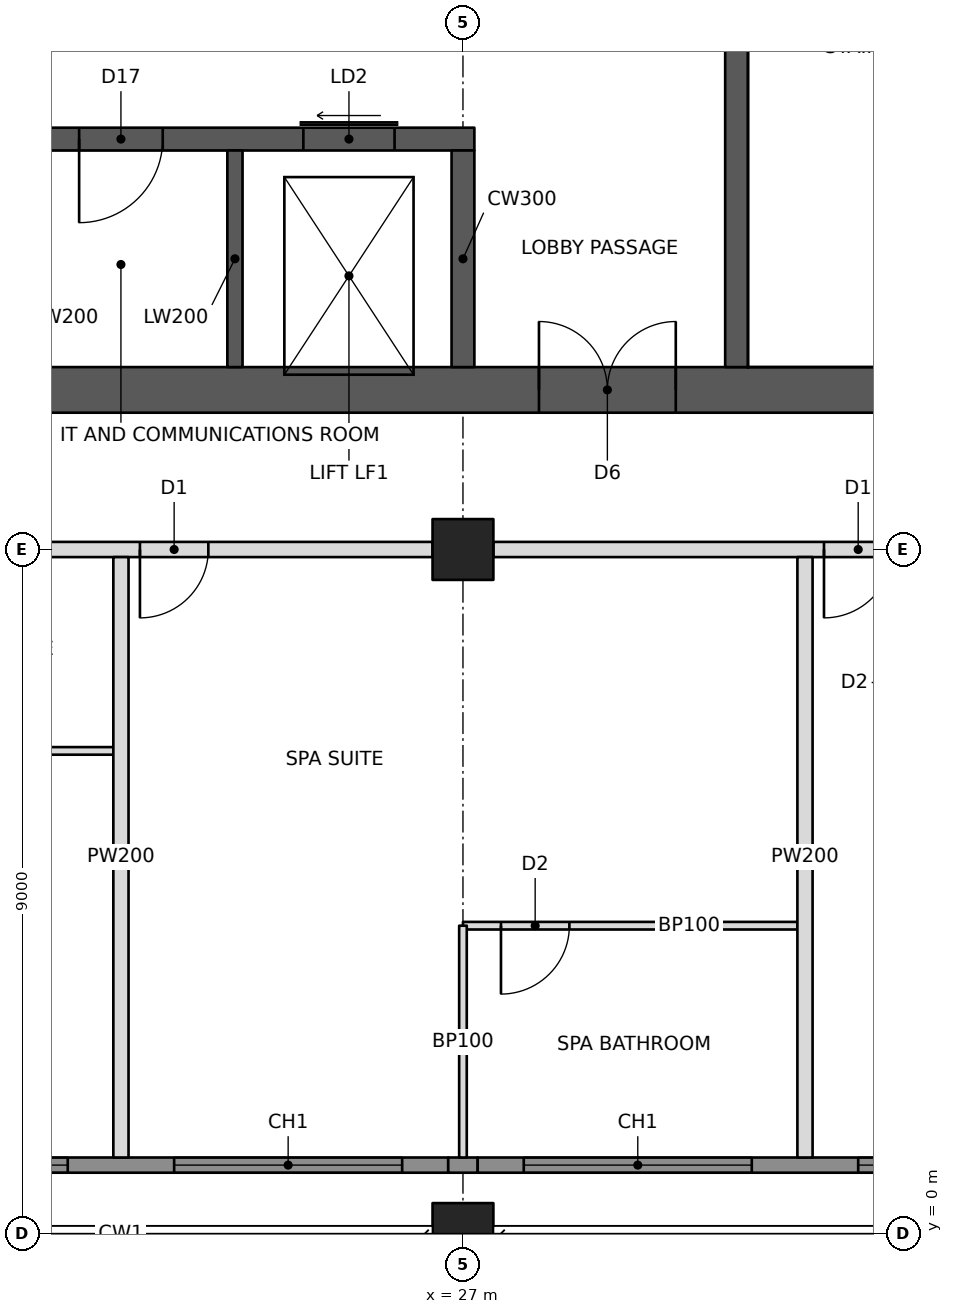
"""IFC4 building model, lengths in metres.
Left out: names, types, materials, properties, quantities, classifications, styles, units other than length and angle.
Written with IfcOpenShell. Run it as: python <this file> out.ifc"""

import sys

from ifc_helpers import new_model, si_unit, direction, frame, frame_2d, origin, origin_2d, place, context, subcontext, project, spatial, rectangle, hollow_rectangle, extrude, element, fill, save


model = new_model("IFC4")
c1 = context("Model", 3, precision=1e-05, world=origin(), true_north=direction((0.0, 1.0)))
c2 = subcontext(c1, "Body", "Model", "MODEL_VIEW")
j1 = project(units=[si_unit("LENGTHUNIT", "METRE"), si_unit("PLANEANGLEUNIT", "RADIAN")], contexts=[c1])
p1 = place(None, origin())
s1 = spatial("IfcSite", under=j1, at=p1, CompositionType="ELEMENT")
p2 = place(p1, origin())
s2 = spatial("IfcBuilding", under=s1, at=p2, CompositionType="ELEMENT")
p3 = place(p2, frame((0.0, 0.0, 204.6)))
s3 = spatial("IfcBuildingStorey", under=s2, at=p3, CompositionType="ELEMENT", Elevation=204.6)
p4 = place(p3, frame((27.0, 0.0, 0.0), z_axis=(0.0, 0.0, 1.0), x_axis=(1.0, 0.0, 0.0)))
e1 = element("IfcColumn", 1, at=p4, inside=s3, PredefinedType="COLUMN", context=c2, shape_type="SweptSolid", body=[
    extrude(hollow_rectangle(XDim=0.8, YDim=0.8, WallThickness=0.06, at=origin_2d()), origin(), (0.0, 0.0, 1.0), 3.4),
])
p5 = place(p3, frame((27.0, 9.0, 0.0), z_axis=(0.0, 0.0, 1.0), x_axis=(1.0, 0.0, 0.0)))
e2 = element("IfcColumn", 2, at=p5, inside=s3, PredefinedType="COLUMN", context=c2, shape_type="SweptSolid", body=[
    extrude(hollow_rectangle(XDim=0.8, YDim=0.8, WallThickness=0.05, at=origin_2d()), origin(), (0.0, 0.0, 1.0), 3.4),
])
p6 = place(p3, frame((10.8, 11.1, 0.0), z_axis=(0.0, 0.0, 1.0), x_axis=(1.0, 0.0, 0.0)))
e3 = element("IfcWall", 3, at=p6, inside=s3, PredefinedType="SHEAR", context=c2, shape_type="SweptSolid", body=[
    extrude(rectangle(XDim=23.4, YDim=0.6, at=frame_2d((11.7, 0.0))), origin(), (0.0, 0.0, 1.0), 3.4),
])
p7 = place(p6, frame((1.0, 0.0, 0.0)))
e4 = element("IfcOpeningElement", 4, at=p7, cuts=e3, PredefinedType="OPENING", context=c2, shape_type="SweptSolid", body=[
    extrude(rectangle(XDim=1.0, YDim=2.1, at=frame_2d((0.5, 1.05))), frame((0.0, 0.31, 0.0), z_axis=(0.0, -1.0, 0.0), x_axis=(1.0, 0.0, 0.0)), (0.0, 0.0, 1.0), 0.62),
])
p8 = place(p6, frame((17.2, 0.0, 0.0)))
e5 = element("IfcOpeningElement", 5, at=p8, cuts=e3, PredefinedType="OPENING", context=c2, shape_type="SweptSolid", body=[
    extrude(rectangle(XDim=1.8, YDim=2.1, at=frame_2d((0.9, 1.05))), frame((0.0, 0.31, 0.0), z_axis=(0.0, -1.0, 0.0), x_axis=(1.0, 0.0, 0.0)), (0.0, 0.0, 1.0), 0.62),
])
p9 = place(p3, frame((18.15, 14.4, 0.0), z_axis=(0.0, 0.0, 1.0), x_axis=(1.0, 0.0, 0.0)))
e6 = element("IfcWall", 6, at=p9, inside=s3, PredefinedType="SHEAR", context=c2, shape_type="SweptSolid", body=[
    extrude(rectangle(XDim=9.0, YDim=0.3, at=frame_2d((4.5, 0.0))), origin(), (0.0, 0.0, 1.0), 3.4),
])
p10 = place(p9, frame((0.8, 0.0, 0.0)))
e7 = element("IfcOpeningElement", 7, at=p10, cuts=e6, PredefinedType="OPENING", context=c2, shape_type="SweptSolid", body=[
    extrude(rectangle(XDim=1.1, YDim=2.1, at=frame_2d((0.55, 1.05))), frame((0.0, 0.16, 0.0), z_axis=(0.0, -1.0, 0.0), x_axis=(1.0, 0.0, 0.0)), (0.0, 0.0, 1.0), 0.32),
])
p11 = place(p9, frame((6.75, 0.0, 0.0)))
e8 = element("IfcOpeningElement", 8, at=p11, cuts=e6, PredefinedType="OPENING", context=c2, shape_type="SweptSolid", body=[
    extrude(rectangle(XDim=1.2, YDim=2.1, at=frame_2d((0.6, 1.05))), frame((0.0, 0.16, 0.0), z_axis=(0.0, -1.0, 0.0), x_axis=(1.0, 0.0, 0.0)), (0.0, 0.0, 1.0), 0.32),
])
p12 = place(p9, frame((3.8, 0.0, 0.0)))
e9 = element("IfcOpeningElement", 9, at=p12, cuts=e6, PredefinedType="OPENING", context=c2, shape_type="SweptSolid", body=[
    extrude(rectangle(XDim=1.1, YDim=2.1, at=frame_2d((0.55, 1.05))), frame((0.0, 0.16, 0.0), z_axis=(0.0, -1.0, 0.0), x_axis=(1.0, 0.0, 0.0)), (0.0, 0.0, 1.0), 0.32),
])
p13 = place(p3, frame((27.0, 11.4, 0.0), z_axis=(0.0, 0.0, 1.0), x_axis=(0.0, 1.0, 0.0)))
e10 = element("IfcWall", 10, at=p13, inside=s3, PredefinedType="SHEAR", context=c2, shape_type="SweptSolid", body=[
    extrude(rectangle(XDim=2.85, YDim=0.3, at=frame_2d((1.425, 0.0))), origin(), (0.0, 0.0, 1.0), 3.4),
])
p14 = place(p3, frame((24.0, 11.4, 0.0), z_axis=(0.0, 0.0, 1.0), x_axis=(0.0, 1.0, 0.0)))
e11 = element("IfcWall", 11, at=p14, inside=s3, PredefinedType="SHEAR", context=c2, shape_type="SweptSolid", body=[
    extrude(rectangle(XDim=2.85, YDim=0.2, at=frame_2d((1.425, 0.0))), origin(), (0.0, 0.0, 1.0), 3.4),
])
p15 = place(p3, frame((30.6, 11.4, 0.0), z_axis=(0.0, 0.0, 1.0), x_axis=(0.0, 1.0, 0.0)))
e12 = element("IfcWall", 12, at=p15, inside=s3, PredefinedType="SHEAR", context=c2, shape_type="SweptSolid", body=[
    extrude(rectangle(XDim=13.2, YDim=0.3, at=frame_2d((6.6, 0.0))), origin(), (0.0, 0.0, 1.0), 3.4),
])
p16 = place(p3, frame((18.4, 9.0, 0.0), z_axis=(0.0, 0.0, 1.0), x_axis=(1.0, 0.0, 0.0)))
e13 = element("IfcWall", 13, at=p16, inside=s3, PredefinedType="PARTITIONING", context=c2, shape_type="SweptSolid", body=[
    extrude(rectangle(XDim=8.2, YDim=0.2, at=frame_2d((4.1, 0.0))), origin(), (0.0, 0.0, 1.0), 2.405),
])
p17 = place(p16, frame((4.35, 0.0, 0.0)))
e14 = element("IfcOpeningElement", 14, at=p17, cuts=e13, PredefinedType="OPENING", context=c2, shape_type="SweptSolid", body=[
    extrude(rectangle(XDim=0.9, YDim=2.1, at=frame_2d((0.45, 1.05))), frame((0.0, 0.11, 0.0), z_axis=(0.0, -1.0, 0.0), x_axis=(1.0, 0.0, 0.0)), (0.0, 0.0, 1.0), 0.22),
])
p18 = place(p3, frame((27.4, 9.0, 0.0), z_axis=(0.0, 0.0, 1.0), x_axis=(1.0, 0.0, 0.0)))
e15 = element("IfcWall", 15, at=p18, inside=s3, PredefinedType="PARTITIONING", context=c2, shape_type="SweptSolid", body=[
    extrude(rectangle(XDim=8.2, YDim=0.2, at=frame_2d((4.1, 0.0))), origin(), (0.0, 0.0, 1.0), 2.405),
])
p19 = place(p18, frame((4.35, 0.0, 0.0)))
e16 = element("IfcOpeningElement", 16, at=p19, cuts=e15, PredefinedType="OPENING", context=c2, shape_type="SweptSolid", body=[
    extrude(rectangle(XDim=0.9, YDim=2.1, at=frame_2d((0.45, 1.05))), frame((0.0, 0.11, 0.0), z_axis=(0.0, -1.0, 0.0), x_axis=(1.0, 0.0, 0.0)), (0.0, 0.0, 1.0), 0.22),
])
for number, where, z_axis, x_axis in (
    (17, (22.5, 8.9, 0.0), (0.0, 0.0, 1.0), (0.0, -1.0, 0.0)),
    (18, (31.5, 8.9, 0.0), (0.0, 0.0, 1.0), (0.0, -1.0, 0.0)),
):
    element("IfcWall", number, at=place(p3, frame(where, z_axis=z_axis, x_axis=x_axis)), inside=s3, PredefinedType="PARTITIONING", context=c2, shape_type="SweptSolid", body=[
        extrude(rectangle(XDim=7.9, YDim=0.2, at=frame_2d((3.95, 0.0))), origin(), (0.0, 0.0, 1.0), 2.404),
    ])
p20 = place(p3, frame((18.95, 6.35, 0.0), z_axis=(0.0, 0.0, 1.0), x_axis=(1.0, 0.0, 0.0)))
e19 = element("IfcWall", 19, at=p20, inside=s3, PredefinedType="PARTITIONING", context=c2, shape_type="SweptSolid", body=[
    extrude(rectangle(XDim=3.45, YDim=0.1, at=frame_2d((1.725, 0.0))), origin(), (0.0, 0.0, 1.0), 3.2),
])
p21 = place(p3, frame((27.0, 4.05, 0.0), z_axis=(0.0, 0.0, 1.0), x_axis=(1.0, 0.0, 0.0)))
e20 = element("IfcWall", 20, at=p21, inside=s3, PredefinedType="PARTITIONING", context=c2, shape_type="SweptSolid", body=[
    extrude(rectangle(XDim=4.4, YDim=0.1, at=frame_2d((2.2, 0.0))), origin(), (0.0, 0.0, 1.0), 2.404),
])
p22 = place(p21, frame((0.5, 0.0, 0.0)))
e21 = element("IfcOpeningElement", 21, at=p22, cuts=e20, PredefinedType="OPENING", context=c2, shape_type="SweptSolid", body=[
    extrude(rectangle(XDim=0.9, YDim=2.1, at=frame_2d((0.45, 1.05))), frame((0.0, 0.06, 0.0), z_axis=(0.0, -1.0, 0.0), x_axis=(1.0, 0.0, 0.0)), (0.0, 0.0, 1.0), 0.12),
])
p23 = place(p3, frame((27.0, 4.05, 0.0), z_axis=(0.0, 0.0, 1.0), x_axis=(0.0, -1.0, 0.0)))
e22 = element("IfcWall", 22, at=p23, inside=s3, PredefinedType="PARTITIONING", context=c2, shape_type="SweptSolid", body=[
    extrude(rectangle(XDim=3.05, YDim=0.1, at=frame_2d((1.525, 0.0))), origin(), (0.0, 0.0, 1.0), 2.405),
])
p24 = place(p3, frame((18.194, 0.9, 0.0), z_axis=(0.0, 0.0, 1.0), x_axis=(1.0, 0.0, 0.0)))
e23 = element("IfcWall", 23, at=p24, inside=s3, PredefinedType="SOLIDWALL", context=c2, shape_type="SweptSolid", body=[
    extrude(rectangle(XDim=8.612, YDim=0.2, at=frame_2d((4.306, 0.0))), origin(), (0.0, 0.0, 1.0), 3.2),
])
p25 = place(p24, frame((0.606, 0.0, 0.6)))
e24 = element("IfcOpeningElement", 24, at=p25, cuts=e23, PredefinedType="OPENING", context=c2, shape_type="SweptSolid", body=[
    extrude(rectangle(XDim=3.0, YDim=2.2, at=frame_2d((1.5, 1.1))), frame((0.0, 0.11, 0.0), z_axis=(0.0, -1.0, 0.0), x_axis=(1.0, 0.0, 0.0)), (0.0, 0.0, 1.0), 0.22),
])
p26 = place(p24, frame((5.006, 0.0, 0.6)))
e25 = element("IfcOpeningElement", 25, at=p26, cuts=e23, PredefinedType="OPENING", context=c2, shape_type="SweptSolid", body=[
    extrude(rectangle(XDim=3.0, YDim=2.2, at=frame_2d((1.5, 1.1))), frame((0.0, 0.11, 0.0), z_axis=(0.0, -1.0, 0.0), x_axis=(1.0, 0.0, 0.0)), (0.0, 0.0, 1.0), 0.22),
])
p27 = place(p3, frame((26.806, 0.9, 0.0), z_axis=(0.0, 0.0, 1.0), x_axis=(1.0, 0.0, 0.0)))
e26 = element("IfcWall", 26, at=p27, inside=s3, PredefinedType="SOLIDWALL", context=c2, shape_type="SweptSolid", body=[
    extrude(rectangle(XDim=0.388, YDim=0.2, at=frame_2d((0.194, 0.0))), origin(), (0.0, 0.0, 1.0), 2.404),
])
p28 = place(p3, frame((27.194, 0.9, 0.0), z_axis=(0.0, 0.0, 1.0), x_axis=(1.0, 0.0, 0.0)))
e27 = element("IfcWall", 27, at=p28, inside=s3, PredefinedType="SOLIDWALL", context=c2, shape_type="SweptSolid", body=[
    extrude(rectangle(XDim=8.671, YDim=0.2, at=frame_2d((4.335, 0.0))), origin(), (0.0, 0.0, 1.0), 3.2),
])
p29 = place(p28, frame((0.606, 0.0, 0.6)))
e28 = element("IfcOpeningElement", 28, at=p29, cuts=e27, PredefinedType="OPENING", context=c2, shape_type="SweptSolid", body=[
    extrude(rectangle(XDim=3.0, YDim=2.2, at=frame_2d((1.5, 1.1))), frame((0.0, 0.11, 0.0), z_axis=(0.0, -1.0, 0.0), x_axis=(1.0, 0.0, 0.0)), (0.0, 0.0, 1.0), 0.22),
])
p30 = place(p28, frame((5.006, 0.0, 0.6)))
e29 = element("IfcOpeningElement", 29, at=p30, cuts=e27, PredefinedType="OPENING", context=c2, shape_type="SweptSolid", body=[
    extrude(rectangle(XDim=3.0, YDim=2.2, at=frame_2d((1.5, 1.1))), frame((0.0, 0.11, 0.0), z_axis=(0.0, -1.0, 0.0), x_axis=(1.0, 0.0, 0.0)), (0.0, 0.0, 1.0), 0.22),
])
p31 = place(p25, origin())
e30 = element("IfcWindow", 30, at=p31, inside=s3, PartitioningType="TRIPLE_PANEL_VERTICAL", PredefinedType="WINDOW", context=c2, shape_type="SweptSolid", body=[
    extrude(rectangle(XDim=3.0, YDim=2.2, at=frame_2d((1.5, 1.1))), frame((0.0, 0.03, 0.0), z_axis=(0.0, -1.0, 0.0), x_axis=(1.0, 0.0, 0.0)), (0.0, 0.0, 1.0), 0.06),
])
fill(e24, e30)
p32 = place(p26, origin())
e31 = element("IfcWindow", 31, at=p32, inside=s3, PartitioningType="TRIPLE_PANEL_VERTICAL", PredefinedType="WINDOW", context=c2, shape_type="SweptSolid", body=[
    extrude(rectangle(XDim=3.0, YDim=2.2, at=frame_2d((1.5, 1.1))), frame((0.0, 0.03, 0.0), z_axis=(0.0, -1.0, 0.0), x_axis=(1.0, 0.0, 0.0)), (0.0, 0.0, 1.0), 0.06),
])
fill(e25, e31)
p33 = place(p29, origin())
e32 = element("IfcWindow", 32, at=p33, inside=s3, PartitioningType="TRIPLE_PANEL_VERTICAL", PredefinedType="WINDOW", context=c2, shape_type="SweptSolid", body=[
    extrude(rectangle(XDim=3.0, YDim=2.2, at=frame_2d((1.5, 1.1))), frame((0.0, 0.03, 0.0), z_axis=(0.0, -1.0, 0.0), x_axis=(1.0, 0.0, 0.0)), (0.0, 0.0, 1.0), 0.06),
])
fill(e28, e32)
p34 = place(p30, origin())
e33 = element("IfcWindow", 33, at=p34, inside=s3, PartitioningType="TRIPLE_PANEL_VERTICAL", PredefinedType="WINDOW", context=c2, shape_type="SweptSolid", body=[
    extrude(rectangle(XDim=3.0, YDim=2.2, at=frame_2d((1.5, 1.1))), frame((0.0, 0.03, 0.0), z_axis=(0.0, -1.0, 0.0), x_axis=(1.0, 0.0, 0.0)), (0.0, 0.0, 1.0), 0.06),
])
fill(e29, e33)
p35 = place(p22, frame((0.9, 0.0, 0.0), z_axis=(0.0, 0.0, 1.0), x_axis=(-1.0, 0.0, 0.0)))
e34 = element("IfcDoor", 34, at=p35, inside=s3, OperationType="SINGLE_SWING_RIGHT", PredefinedType="DOOR", context=c2, shape_type="SweptSolid", body=[
    extrude(rectangle(XDim=0.9, YDim=2.1, at=frame_2d((0.45, 1.05))), frame((0.0, 0.025, 0.0), z_axis=(0.0, -1.0, 0.0), x_axis=(1.0, 0.0, 0.0)), (0.0, 0.0, 1.0), 0.05),
])
fill(e21, e34)
p36 = place(p17, frame((0.9, 0.0, 0.0), z_axis=(0.0, 0.0, 1.0), x_axis=(-1.0, 0.0, 0.0)))
e35 = element("IfcDoor", 35, at=p36, inside=s3, OperationType="SINGLE_SWING_RIGHT", PredefinedType="DOOR", context=c2, shape_type="SweptSolid", body=[
    extrude(rectangle(XDim=0.9, YDim=2.1, at=frame_2d((0.45, 1.05))), frame((0.0, 0.025, 0.0), z_axis=(0.0, -1.0, 0.0), x_axis=(1.0, 0.0, 0.0)), (0.0, 0.0, 1.0), 0.05),
])
fill(e14, e35)
p37 = place(p19, frame((0.9, 0.0, 0.0), z_axis=(0.0, 0.0, 1.0), x_axis=(-1.0, 0.0, 0.0)))
e36 = element("IfcDoor", 36, at=p37, inside=s3, OperationType="SINGLE_SWING_RIGHT", PredefinedType="DOOR", context=c2, shape_type="SweptSolid", body=[
    extrude(rectangle(XDim=0.9, YDim=2.1, at=frame_2d((0.45, 1.05))), frame((0.0, 0.025, 0.0), z_axis=(0.0, -1.0, 0.0), x_axis=(1.0, 0.0, 0.0)), (0.0, 0.0, 1.0), 0.05),
])
fill(e16, e36)
p38 = place(p8, origin())
e37 = element("IfcDoor", 37, at=p38, inside=s3, OperationType="DOUBLE_DOOR_SINGLE_SWING", PredefinedType="DOOR", context=c2, shape_type="SweptSolid", body=[
    extrude(rectangle(XDim=1.8, YDim=2.1, at=frame_2d((0.9, 1.05))), frame((0.0, 0.025, 0.0), z_axis=(0.0, -1.0, 0.0), x_axis=(1.0, 0.0, 0.0)), (0.0, 0.0, 1.0), 0.05),
])
fill(e5, e37)
p39 = place(p11, origin())
e38 = element("IfcDoor", 38, at=p39, inside=s3, OperationType="SLIDING_TO_LEFT", PredefinedType="DOOR", context=c2, shape_type="SweptSolid", body=[
    extrude(rectangle(XDim=1.2, YDim=2.1, at=frame_2d((0.6, 1.05))), frame((0.0, 0.025, 0.0), z_axis=(0.0, -1.0, 0.0), x_axis=(1.0, 0.0, 0.0)), (0.0, 0.0, 1.0), 0.05),
])
fill(e8, e38)
p40 = place(p12, frame((1.1, 0.0, 0.0), z_axis=(0.0, 0.0, 1.0), x_axis=(-1.0, 0.0, 0.0)))
e39 = element("IfcDoor", 39, at=p40, inside=s3, OperationType="SINGLE_SWING_RIGHT", PredefinedType="DOOR", context=c2, shape_type="SweptSolid", body=[
    extrude(rectangle(XDim=1.1, YDim=2.1, at=frame_2d((0.55, 1.05))), frame((0.0, 0.025, 0.0), z_axis=(0.0, -1.0, 0.0), x_axis=(1.0, 0.0, 0.0)), (0.0, 0.0, 1.0), 0.05),
])
fill(e9, e39)
save(model, sys.argv[1])
